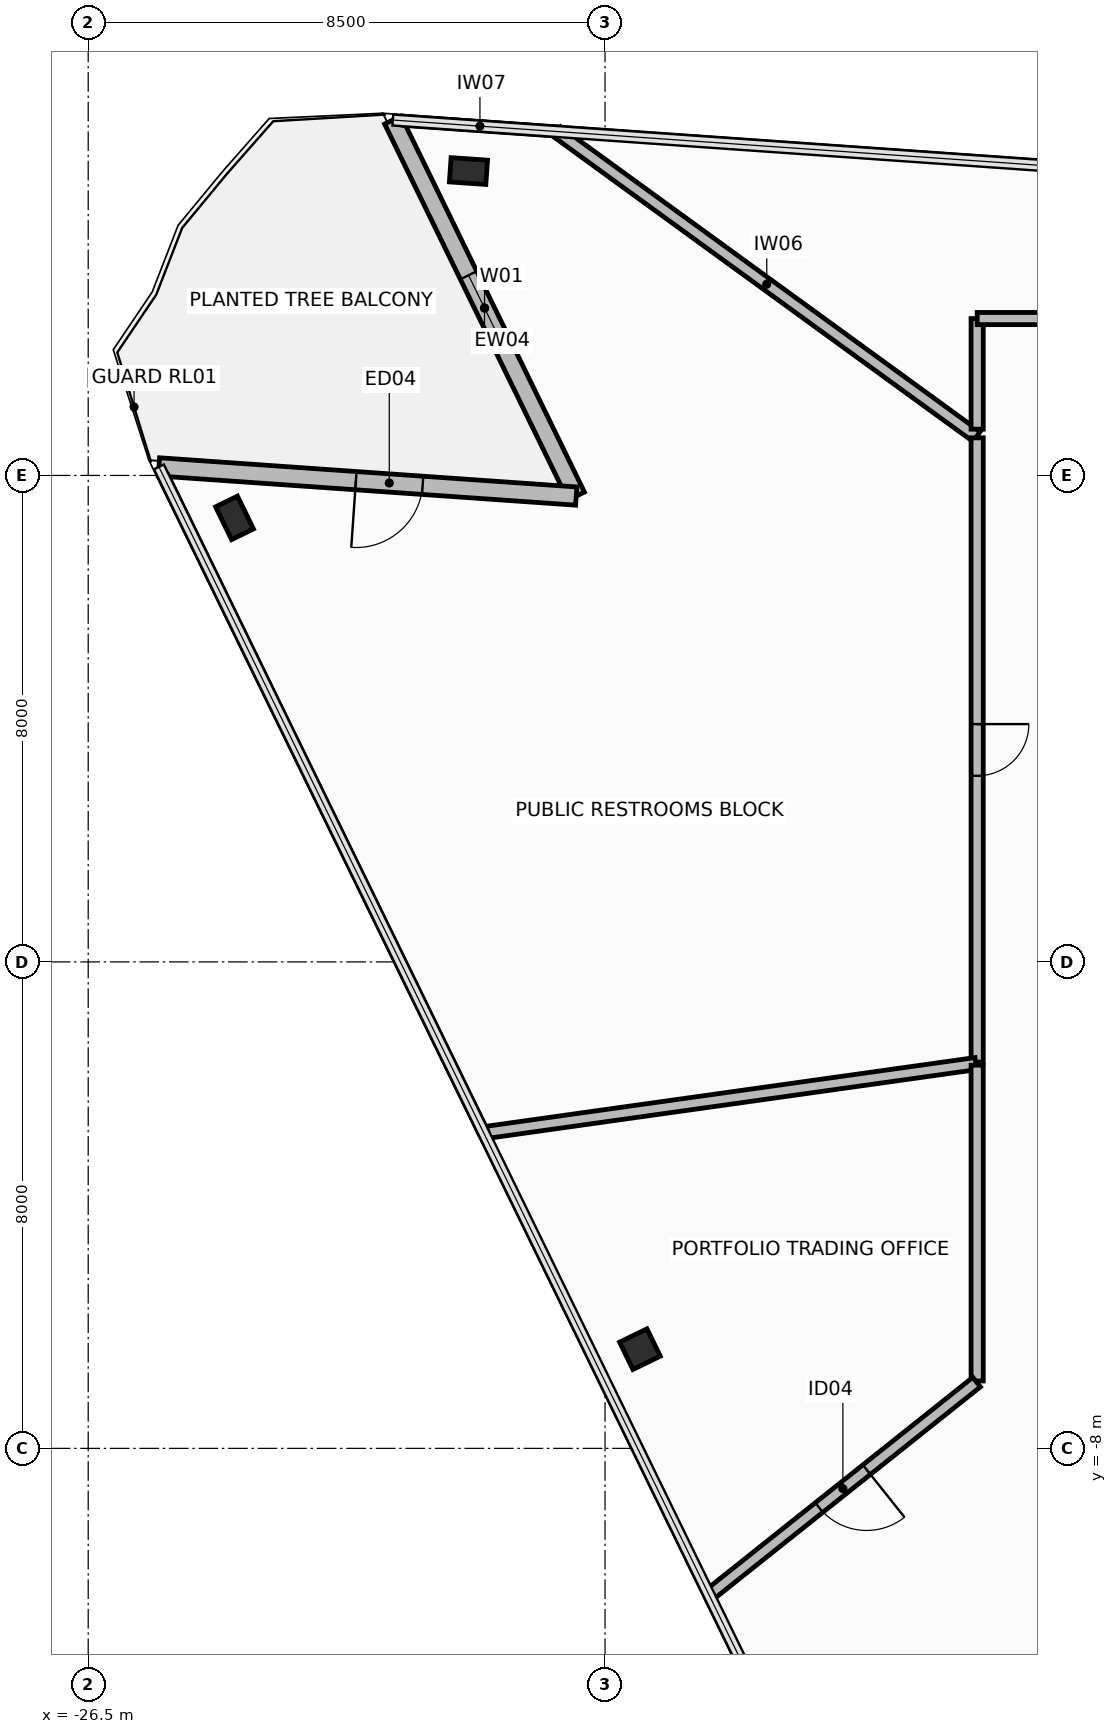
"""IFC4 building model, lengths in metres.
Left out: names, types, materials, properties, quantities, classifications, styles, units other than length and angle.
Written with IfcOpenShell. Run it as: python <this file> out.ifc"""

import sys

from ifc_helpers import new_model, si_unit, direction, frame, frame_2d, origin, origin_2d, place, context, subcontext, project, spatial, rectangle, hollow_rectangle, extrude, element, fill, save


model = new_model("IFC4")
c1 = context("Model", 3, precision=1e-05, world=origin(), true_north=direction((0.0, 1.0)))
c2 = subcontext(c1, "Body", "Model", "MODEL_VIEW")
j1 = project(units=[si_unit("LENGTHUNIT", "METRE"), si_unit("PLANEANGLEUNIT", "RADIAN")], contexts=[c1])
p1 = place(None, origin())
s1 = spatial("IfcSite", under=j1, at=p1, CompositionType="ELEMENT")
p2 = place(p1, origin())
s2 = spatial("IfcBuilding", under=s1, at=p2, CompositionType="ELEMENT")
p3 = place(p2, frame((0.0, 0.0, 245.05)))
s3 = spatial("IfcBuildingStorey", under=s2, at=p3, CompositionType="ELEMENT", Elevation=245.05)
p4 = place(p3, frame((-24.094, 7.302, 0.0), z_axis=(0.0, 0.0, 1.0), x_axis=(-0.438371146789, 0.898794046299, 0.0)))
e1 = element("IfcColumn", 1, at=p4, inside=s3, PredefinedType="COLUMN", context=c2, shape_type="SweptSolid", body=[
    extrude(hollow_rectangle(XDim=0.4, YDim=0.6, WallThickness=0.03, at=origin_2d()), origin(), (0.0, 0.0, 1.0), 3.6),
])
p5 = place(p3, frame((-17.426, -6.369, 0.0), z_axis=(0.0, 0.0, 1.0), x_axis=(-0.438371146789, 0.898794046299, 0.0)))
e2 = element("IfcColumn", 2, at=p5, inside=s3, PredefinedType="COLUMN", context=c2, shape_type="SweptSolid", body=[
    extrude(hollow_rectangle(XDim=0.5, YDim=0.5, WallThickness=0.032, at=origin_2d()), origin(), (0.0, 0.0, 1.0), 3.6),
])
p6 = place(p3, frame((-20.246, 13.006, 0.0), z_axis=(0.0, 0.0, 1.0), x_axis=(-0.99756405026, 0.069756473744, 0.0)))
e3 = element("IfcColumn", 3, at=p6, inside=s3, PredefinedType="COLUMN", context=c2, shape_type="SweptSolid", body=[
    extrude(hollow_rectangle(XDim=0.4, YDim=0.6, WallThickness=0.03, at=origin_2d()), origin(), (0.0, 0.0, 1.0), 3.6),
])
p7 = place(p3, frame((-21.49, 13.844, 0.0), z_axis=(0.0, 0.0, 1.0), x_axis=(0.438391471143, -0.898784133165, 0.0)))
e4 = element("IfcWall", 4, at=p7, inside=s3, PredefinedType="STANDARD", context=c2, shape_type="SweptSolid", body=[
    extrude(rectangle(XDim=6.88, YDim=0.3, at=frame_2d((3.44, 0.0))), origin(), (0.0, 0.0, 1.0), 2.765),
])
p8 = place(p7, frame((2.84, 0.0, 0.485)))
e5 = element("IfcOpeningElement", 5, at=p8, cuts=e4, PredefinedType="OPENING", context=c2, shape_type="SweptSolid", body=[
    extrude(rectangle(XDim=1.2, YDim=2.1, at=frame_2d((0.6, 1.05))), frame((0.0, 0.16, 0.0), z_axis=(0.0, -1.0, 0.0), x_axis=(1.0, 0.0, 0.0)), (0.0, 0.0, 1.0), 0.32),
])
p9 = place(p3, frame((-18.474, 7.661, 0.0), z_axis=(0.0, 0.0, 1.0), x_axis=(-0.997565982203, 0.069728840176, 0.0)))
e6 = element("IfcWall", 6, at=p9, inside=s3, PredefinedType="STANDARD", context=c2, shape_type="SweptSolid", body=[
    extrude(rectangle(XDim=6.88, YDim=0.3, at=frame_2d((3.44, 0.0))), origin(), (0.0, 0.0, 1.0), 2.765),
])
p10 = place(p9, frame((2.532, 0.0, 0.0)))
e7 = element("IfcOpeningElement", 7, at=p10, cuts=e6, PredefinedType="OPENING", context=c2, shape_type="SweptSolid", body=[
    extrude(rectangle(XDim=1.1, YDim=2.2, at=frame_2d((0.55, 1.1))), frame((0.0, 0.16, 0.0), z_axis=(0.0, -1.0, 0.0), x_axis=(1.0, 0.0, 0.0)), (0.0, 0.0, 1.0), 0.32),
])
p11 = place(p3, frame((-21.311, 13.832, 0.0), z_axis=(0.0, 0.0, 1.0), x_axis=(0.997559711148, -0.06981849823, 0.0)))
e8 = element("IfcWall", 8, at=p11, inside=s3, PredefinedType="PARTITIONING", context=c2, shape_type="SweptSolid", body=[
    extrude(rectangle(XDim=2.514, YDim=0.15, at=frame_2d((1.257, 0.0))), origin(), (0.0, 0.0, 1.0), 3.42),
])
p12 = place(p3, frame((-18.79, 13.652, 0.0), z_axis=(0.0, 0.0, 1.0), x_axis=(0.809024412074, -0.58777504257, 0.0)))
e9 = element("IfcWall", 9, at=p12, inside=s3, PredefinedType="PARTITIONING", context=c2, shape_type="SweptSolid", body=[
    extrude(rectangle(XDim=8.529, YDim=0.2, at=frame_2d((4.264, 0.0))), origin(), (0.0, 0.0, 1.0), 2.765),
])
p13 = place(p3, frame((-11.88, 8.619, 0.0), z_axis=(0.0, 0.0, 1.0), x_axis=(0.0, -1.0, 0.0)))
e10 = element("IfcWall", 10, at=p13, inside=s3, PredefinedType="PARTITIONING", context=c2, shape_type="SweptSolid", body=[
    extrude(rectangle(XDim=10.267, YDim=0.2, at=frame_2d((5.133, 0.0))), origin(), (0.0, 0.0, 1.0), 2.765),
])
p14 = place(p13, frame((4.708, 0.0, 0.0)))
e11 = element("IfcOpeningElement", 11, at=p14, cuts=e10, PredefinedType="OPENING", context=c2, shape_type="SweptSolid", body=[
    extrude(rectangle(XDim=0.85, YDim=2.1, at=frame_2d((0.425, 1.05))), frame((0.0, 0.11, 0.0), z_axis=(0.0, -1.0, 0.0), x_axis=(1.0, 0.0, 0.0)), (0.0, 0.0, 1.0), 0.22),
])
p15 = place(p3, frame((-11.902, -1.673, 0.0), z_axis=(0.0, 0.0, 1.0), x_axis=(-0.990269023178, -0.139166309626, 0.0)))
e12 = element("IfcWall", 12, at=p15, inside=s3, PredefinedType="PARTITIONING", context=c2, shape_type="SweptSolid", body=[
    extrude(rectangle(XDim=8.156, YDim=0.2, at=frame_2d((4.078, 0.0))), origin(), (0.0, 0.0, 1.0), 2.765),
])
p16 = place(p3, frame((-20.004, -2.794, 0.0), z_axis=(0.0, 0.0, 1.0), x_axis=(-0.438368655721, 0.89879526127, 0.0)))
e13 = element("IfcWall", 13, at=p16, inside=s3, PredefinedType="PARTITIONING", context=c2, shape_type="SweptSolid", body=[
    extrude(rectangle(XDim=11.987, YDim=0.15, at=frame_2d((5.993, 0.0))), origin(), (0.0, 0.0, 1.0), 3.42),
])
p17 = place(p3, frame((-13.145, -16.825, 0.0), z_axis=(0.0, 0.0, 1.0), x_axis=(0.615675775654, 0.787999580757, 0.0)))
e14 = element("IfcWall", 14, at=p17, inside=s3, PredefinedType="PARTITIONING", context=c2, shape_type="SweptSolid", body=[
    extrude(rectangle(XDim=7.913, YDim=0.2, at=frame_2d((3.956, 0.0))), origin(), (0.0, 0.0, 1.0), 2.765),
])
p18 = place(p3, frame((-11.88, 10.579, 0.0), z_axis=(0.0, 0.0, 1.0), x_axis=(0.0, -1.0, 0.0)))
e15 = element("IfcWall", 15, at=p18, inside=s3, PredefinedType="PARTITIONING", context=c2, shape_type="SweptSolid", body=[
    extrude(rectangle(XDim=1.818, YDim=0.2, at=frame_2d((0.909, 0.0))), origin(), (0.0, 0.0, 1.0), 2.915),
])
p19 = place(p3, frame((-1.895, 10.58, 0.0), z_axis=(0.0, 0.0, 1.0), x_axis=(-1.0, 0.0, 0.0)))
e16 = element("IfcWall", 16, at=p19, inside=s3, PredefinedType="PARTITIONING", context=c2, shape_type="SweptSolid", body=[
    extrude(rectangle(XDim=9.984, YDim=0.2, at=frame_2d((4.992, 0.0))), origin(), (0.0, 0.0, 1.0), 2.915),
])
p20 = place(p19, frame((4.492, 0.0, 0.0)))
e17 = element("IfcOpeningElement", 17, at=p20, cuts=e16, PredefinedType="OPENING", context=c2, shape_type="SweptSolid", body=[
    extrude(rectangle(XDim=1.0, YDim=2.15, at=frame_2d((0.5, 1.075))), frame((0.0, 0.11, 0.0), z_axis=(0.0, -1.0, 0.0), x_axis=(1.0, 0.0, 0.0)), (0.0, 0.0, 1.0), 0.22),
])
p21 = place(p3, frame((-11.88, -1.698, 0.0), z_axis=(0.0, 0.0, 1.0), x_axis=(0.0, -1.0, 0.0)))
e18 = element("IfcWall", 18, at=p21, inside=s3, PredefinedType="PARTITIONING", context=c2, shape_type="SweptSolid", body=[
    extrude(rectangle(XDim=5.193, YDim=0.2, at=frame_2d((2.596, 0.0))), origin(), (0.0, 0.0, 1.0), 3.42),
])
p22 = place(p3, frame((-11.889, -6.911, 0.0), z_axis=(0.0, 0.0, 1.0), x_axis=(-0.782362036509, -0.622823926828, 0.0)))
e19 = element("IfcWall", 19, at=p22, inside=s3, PredefinedType="PARTITIONING", context=c2, shape_type="SweptSolid", body=[
    extrude(rectangle(XDim=5.622, YDim=0.2, at=frame_2d((2.811, 0.0))), origin(), (0.0, 0.0, 1.0), 2.765),
])
p23 = place(p22, frame((2.311, 0.0, 0.0)))
e20 = element("IfcOpeningElement", 20, at=p23, cuts=e19, PredefinedType="OPENING", context=c2, shape_type="SweptSolid", body=[
    extrude(rectangle(XDim=1.0, YDim=2.15, at=frame_2d((0.5, 1.075))), frame((0.0, 0.11, 0.0), z_axis=(0.0, -1.0, 0.0), x_axis=(1.0, 0.0, 0.0)), (0.0, 0.0, 1.0), 0.22),
])
p24 = place(p10, frame((1.1, 0.0, 0.0), z_axis=(0.0, 0.0, 1.0), x_axis=(-1.0, 0.0, 0.0)))
e21 = element("IfcDoor", 21, at=p24, inside=s3, OperationType="SINGLE_SWING_LEFT", PredefinedType="DOOR", context=c2, shape_type="SweptSolid", body=[
    extrude(rectangle(XDim=1.1, YDim=2.2, at=frame_2d((0.55, 1.1))), frame((0.0, 0.025, 0.0), z_axis=(0.0, -1.0, 0.0), x_axis=(1.0, 0.0, 0.0)), (0.0, 0.0, 1.0), 0.05),
])
fill(e7, e21)
p25 = place(p8, origin())
e22 = element("IfcWindow", 22, at=p25, inside=s3, PartitioningType="SINGLE_PANEL", PredefinedType="WINDOW", context=c2, shape_type="SweptSolid", body=[
    extrude(rectangle(XDim=1.2, YDim=2.1, at=frame_2d((0.6, 1.05))), frame((0.0, 0.03, 0.0), z_axis=(0.0, -1.0, 0.0), x_axis=(1.0, 0.0, 0.0)), (0.0, 0.0, 1.0), 0.06),
])
fill(e5, e22)
p26 = place(p14, origin())
e23 = element("IfcDoor", 23, at=p26, inside=s3, OperationType="SINGLE_SWING_RIGHT", PredefinedType="DOOR", context=c2, shape_type="SweptSolid", body=[
    extrude(rectangle(XDim=0.85, YDim=2.1, at=frame_2d((0.425, 1.05))), frame((0.0, 0.025, 0.0), z_axis=(0.0, -1.0, 0.0), x_axis=(1.0, 0.0, 0.0)), (0.0, 0.0, 1.0), 0.05),
])
fill(e11, e23)
p27 = place(p23, origin())
e24 = element("IfcDoor", 24, at=p27, inside=s3, OperationType="SINGLE_SWING_RIGHT", PredefinedType="DOOR", context=c2, shape_type="SweptSolid", body=[
    extrude(rectangle(XDim=1.0, YDim=2.15, at=frame_2d((0.5, 1.075))), frame((0.0, 0.025, 0.0), z_axis=(0.0, -1.0, 0.0), x_axis=(1.0, 0.0, 0.0)), (0.0, 0.0, 1.0), 0.05),
])
fill(e20, e24)
save(model, sys.argv[1])
